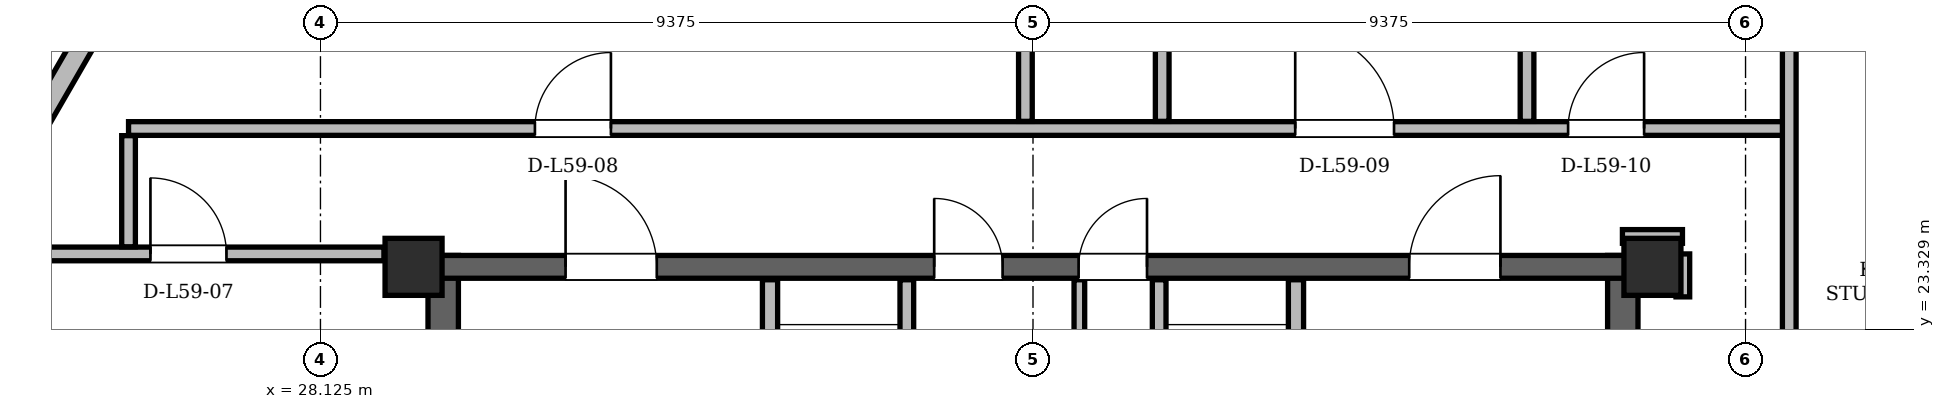
"""IFC4 building model, lengths in metres.
Left out: names, types, materials, properties, quantities, classifications, styles, units other than length and angle.
Written with IfcOpenShell. Run it as: python <this file> out.ifc"""

import sys

from ifc_helpers import new_model, si_unit, direction, frame, frame_2d, origin, origin_2d, place, context, subcontext, project, spatial, rectangle, hollow_rectangle, extrude, element, fill, save


model = new_model("IFC4")
c1 = context("Model", 3, precision=1e-05, world=origin(), true_north=direction((0.0, 1.0)))
c2 = subcontext(c1, "Body", "Model", "MODEL_VIEW")
j1 = project(units=[si_unit("LENGTHUNIT", "METRE"), si_unit("PLANEANGLEUNIT", "RADIAN")], contexts=[c1])
p1 = place(None, origin())
s1 = spatial("IfcSite", under=j1, at=p1, CompositionType="ELEMENT")
p2 = place(p1, origin())
s2 = spatial("IfcBuilding", under=s1, at=p2, CompositionType="ELEMENT")
p3 = place(p2, frame((0.0, 0.0, 223.5)))
s3 = spatial("IfcBuildingStorey", under=s2, at=p3, CompositionType="ELEMENT", Elevation=223.5)
for number, where, z_axis, x_axis in (
    (1, (45.65, 24.15, 0.0), (0.0, 0.0, 1.0), (1.0, 0.0, 0.0)),
    (2, (29.35, 24.15, 0.0), (0.0, 0.0, 1.0), (1.0, 0.0, 0.0)),
):
    element("IfcColumn", number, at=place(p3, frame(where, z_axis=z_axis, x_axis=x_axis)), inside=s3, PredefinedType="COLUMN", context=c2, shape_type="SweptSolid", body=[
        extrude(hollow_rectangle(XDim=0.75, YDim=0.75, WallThickness=0.06, at=origin_2d()), origin(), (0.0, 0.0, 1.0), 3.6),
    ])
for number, where, z_axis, x_axis in (
    (3, (29.74, 11.0, 0.0), (0.0, 0.0, 1.0), (0.0, 1.0, 0.0)),
    (4, (45.26, 11.0, 0.0), (0.0, 0.0, 1.0), (0.0, 1.0, 0.0)),
):
    element("IfcWall", number, at=place(p3, frame(where, z_axis=z_axis, x_axis=x_axis)), inside=s3, PredefinedType="SHEAR", context=c2, shape_type="SweptSolid", body=[
        extrude(rectangle(XDim=13.3, YDim=0.4, at=frame_2d((6.65, 0.0))), origin(), (0.0, 0.0, 1.0), 3.38),
    ])
p4 = place(p3, frame((29.65, 24.15, 0.0), z_axis=(0.0, 0.0, 1.0), x_axis=(1.0, 0.0, 0.0)))
e5 = element("IfcWall", 5, at=p4, inside=s3, PredefinedType="SHEAR", context=c2, shape_type="SweptSolid", body=[
    extrude(rectangle(XDim=15.7, YDim=0.3, at=frame_2d((7.85, 0.0))), origin(), (0.0, 0.0, 1.0), 3.38),
])
p5 = place(p4, frame((1.7, 0.0, 0.0)))
e6 = element("IfcOpeningElement", 6, at=p5, cuts=e5, PredefinedType="OPENING", context=c2, shape_type="SweptSolid", body=[
    extrude(rectangle(XDim=1.2, YDim=2.2, at=frame_2d((0.6, 1.1))), frame((0.0, 0.15, 0.0), z_axis=(0.0, -1.0, 0.0), x_axis=(1.0, 0.0, 0.0)), (0.0, 0.0, 1.0), 0.3),
])
p6 = place(p4, frame((12.8, 0.0, 0.0)))
e7 = element("IfcOpeningElement", 7, at=p6, cuts=e5, PredefinedType="OPENING", context=c2, shape_type="SweptSolid", body=[
    extrude(rectangle(XDim=1.2, YDim=2.2, at=frame_2d((0.6, 1.1))), frame((0.0, 0.15, 0.0), z_axis=(0.0, -1.0, 0.0), x_axis=(1.0, 0.0, 0.0)), (0.0, 0.0, 1.0), 0.3),
])
p7 = place(p4, frame((6.55, 0.0, 0.0)))
e8 = element("IfcOpeningElement", 8, at=p7, cuts=e5, PredefinedType="OPENING", context=c2, shape_type="SweptSolid", body=[
    extrude(rectangle(XDim=0.9, YDim=2.05, at=frame_2d((0.45, 1.025))), frame((0.0, 0.15, 0.0), z_axis=(0.0, -1.0, 0.0), x_axis=(1.0, 0.0, 0.0)), (0.0, 0.0, 1.0), 0.3),
])
p8 = place(p4, frame((8.45, 0.0, 0.0)))
e9 = element("IfcOpeningElement", 9, at=p8, cuts=e5, PredefinedType="OPENING", context=c2, shape_type="SweptSolid", body=[
    extrude(rectangle(XDim=0.9, YDim=2.05, at=frame_2d((0.45, 1.025))), frame((0.0, 0.15, 0.0), z_axis=(0.0, -1.0, 0.0), x_axis=(1.0, 0.0, 0.0)), (0.0, 0.0, 1.0), 0.3),
])
p9 = place(p3, frame((59.07, 11.372, 0.0), z_axis=(0.0, 0.0, 1.0), x_axis=(-0.500000292553, 0.866025234879, 0.0)))
e10 = element("IfcWall", 10, at=p9, inside=s3, PredefinedType="SOLIDWALL", context=c2, shape_type="SweptSolid", body=[
    extrude(rectangle(XDim=36.688, YDim=0.29, at=frame_2d((18.344, 0.0))), origin(), (0.0, 0.0, 1.0), 2.677),
])
p10 = place(p9, frame((3.429, 0.0, 0.0)))
e11 = element("IfcOpeningElement", 11, at=p10, cuts=e10, PredefinedType="OPENING", context=c2, shape_type="SweptSolid", body=[
    extrude(rectangle(XDim=1.5, YDim=2.2, at=frame_2d((0.75, 1.1))), frame((0.0, 0.145, 0.0), z_axis=(0.0, -1.0, 0.0), x_axis=(1.0, 0.0, 0.0)), (0.0, 0.0, 1.0), 0.29),
])
p11 = place(p9, frame((27.154, 0.0, 0.0)))
e12 = element("IfcOpeningElement", 12, at=p11, cuts=e10, PredefinedType="OPENING", context=c2, shape_type="SweptSolid", body=[
    extrude(rectangle(XDim=1.5, YDim=2.2, at=frame_2d((0.75, 1.1))), frame((0.0, 0.145, 0.0), z_axis=(0.0, -1.0, 0.0), x_axis=(1.0, 0.0, 0.0)), (0.0, 0.0, 1.0), 0.29),
])
p12 = place(p9, frame((7.878, 0.0, 0.85)))
e13 = element("IfcOpeningElement", 13, at=p12, cuts=e10, PredefinedType="OPENING", context=c2, shape_type="SweptSolid", body=[
    extrude(rectangle(XDim=1.2, YDim=1.48, at=frame_2d((0.6, 0.74))), frame((0.0, 0.145, 0.0), z_axis=(0.0, -1.0, 0.0), x_axis=(1.0, 0.0, 0.0)), (0.0, 0.0, 1.0), 0.29),
])
p13 = place(p9, frame((1.266, 0.0, 0.85)))
e14 = element("IfcOpeningElement", 14, at=p13, cuts=e10, PredefinedType="OPENING", context=c2, shape_type="SweptSolid", body=[
    extrude(rectangle(XDim=1.2, YDim=1.48, at=frame_2d((0.6, 0.74))), frame((0.0, 0.145, 0.0), z_axis=(0.0, -1.0, 0.0), x_axis=(1.0, 0.0, 0.0)), (0.0, 0.0, 1.0), 0.29),
])
p14 = place(p9, frame((12.232, 0.0, 0.85)))
e15 = element("IfcOpeningElement", 15, at=p14, cuts=e10, PredefinedType="OPENING", context=c2, shape_type="SweptSolid", body=[
    extrude(rectangle(XDim=2.0, YDim=1.717, at=frame_2d((1.0, 0.858))), frame((0.0, 0.145, 0.0), z_axis=(0.0, -1.0, 0.0), x_axis=(1.0, 0.0, 0.0)), (0.0, 0.0, 1.0), 0.29),
])
p15 = place(p9, frame((17.268, 0.0, 0.85)))
e16 = element("IfcOpeningElement", 16, at=p15, cuts=e10, PredefinedType="OPENING", context=c2, shape_type="SweptSolid", body=[
    extrude(rectangle(XDim=1.4, YDim=1.6, at=frame_2d((0.7, 0.8))), frame((0.0, 0.145, 0.0), z_axis=(0.0, -1.0, 0.0), x_axis=(1.0, 0.0, 0.0)), (0.0, 0.0, 1.0), 0.29),
])
p16 = place(p9, frame((20.594, 0.0, 0.85)))
e17 = element("IfcOpeningElement", 17, at=p16, cuts=e10, PredefinedType="OPENING", context=c2, shape_type="SweptSolid", body=[
    extrude(rectangle(XDim=1.2, YDim=1.48, at=frame_2d((0.6, 0.74))), frame((0.0, 0.145, 0.0), z_axis=(0.0, -1.0, 0.0), x_axis=(1.0, 0.0, 0.0)), (0.0, 0.0, 1.0), 0.29),
])
p17 = place(p9, frame((34.312, 0.0, 0.85)))
e18 = element("IfcOpeningElement", 18, at=p17, cuts=e10, PredefinedType="OPENING", context=c2, shape_type="SweptSolid", body=[
    extrude(rectangle(XDim=1.2, YDim=1.48, at=frame_2d((0.6, 0.74))), frame((0.0, 0.145, 0.0), z_axis=(0.0, -1.0, 0.0), x_axis=(1.0, 0.0, 0.0)), (0.0, 0.0, 1.0), 0.29),
])
p18 = place(p3, frame((34.274, 43.144, 0.0), z_axis=(0.0, 0.0, 1.0), x_axis=(-0.500000292553, -0.866025234879, 0.0)))
e19 = element("IfcWall", 19, at=p18, inside=s3, PredefinedType="SOLIDWALL", context=c2, shape_type="SweptSolid", body=[
    extrude(rectangle(XDim=36.688, YDim=0.29, at=frame_2d((18.344, 0.0))), origin(), (0.0, 0.0, 1.0), 2.677),
])
p19 = place(p18, frame((3.429, 0.0, 0.0)))
e20 = element("IfcOpeningElement", 20, at=p19, cuts=e19, PredefinedType="OPENING", context=c2, shape_type="SweptSolid", body=[
    extrude(rectangle(XDim=1.5, YDim=2.2, at=frame_2d((0.75, 1.1))), frame((0.0, 0.145, 0.0), z_axis=(0.0, -1.0, 0.0), x_axis=(1.0, 0.0, 0.0)), (0.0, 0.0, 1.0), 0.29),
])
p20 = place(p18, frame((27.154, 0.0, 0.0)))
e21 = element("IfcOpeningElement", 21, at=p20, cuts=e19, PredefinedType="OPENING", context=c2, shape_type="SweptSolid", body=[
    extrude(rectangle(XDim=1.5, YDim=2.2, at=frame_2d((0.75, 1.1))), frame((0.0, 0.145, 0.0), z_axis=(0.0, -1.0, 0.0), x_axis=(1.0, 0.0, 0.0)), (0.0, 0.0, 1.0), 0.29),
])
p21 = place(p18, frame((22.893, 0.0, 0.85)))
e22 = element("IfcOpeningElement", 22, at=p21, cuts=e19, PredefinedType="OPENING", context=c2, shape_type="SweptSolid", body=[
    extrude(rectangle(XDim=1.2, YDim=1.48, at=frame_2d((0.6, 0.74))), frame((0.0, 0.145, 0.0), z_axis=(0.0, -1.0, 0.0), x_axis=(1.0, 0.0, 0.0)), (0.0, 0.0, 1.0), 0.29),
])
p22 = place(p18, frame((33.124, 0.0, 0.85)))
e23 = element("IfcOpeningElement", 23, at=p22, cuts=e19, PredefinedType="OPENING", context=c2, shape_type="SweptSolid", body=[
    extrude(rectangle(XDim=1.2, YDim=1.48, at=frame_2d((0.6, 0.74))), frame((0.0, 0.145, 0.0), z_axis=(0.0, -1.0, 0.0), x_axis=(1.0, 0.0, 0.0)), (0.0, 0.0, 1.0), 0.29),
])
p23 = place(p18, frame((8.469, 0.0, 0.85)))
e24 = element("IfcOpeningElement", 24, at=p23, cuts=e19, PredefinedType="OPENING", context=c2, shape_type="SweptSolid", body=[
    extrude(rectangle(XDim=1.2, YDim=1.48, at=frame_2d((0.6, 0.74))), frame((0.0, 0.145, 0.0), z_axis=(0.0, -1.0, 0.0), x_axis=(1.0, 0.0, 0.0)), (0.0, 0.0, 1.0), 0.29),
])
p24 = place(p18, frame((15.521, 0.0, 0.85)))
e25 = element("IfcOpeningElement", 25, at=p24, cuts=e19, PredefinedType="OPENING", context=c2, shape_type="SweptSolid", body=[
    extrude(rectangle(XDim=2.8, YDim=1.717, at=frame_2d((1.4, 0.858))), frame((0.0, 0.145, 0.0), z_axis=(0.0, -1.0, 0.0), x_axis=(1.0, 0.0, 0.0)), (0.0, 0.0, 1.0), 0.29),
])
p25 = place(p18, frame((1.499, 0.0, 0.85)))
e26 = element("IfcOpeningElement", 26, at=p25, cuts=e19, PredefinedType="OPENING", context=c2, shape_type="SweptSolid", body=[
    extrude(rectangle(XDim=1.2, YDim=1.48, at=frame_2d((0.6, 0.74))), frame((0.0, 0.145, 0.0), z_axis=(0.0, -1.0, 0.0), x_axis=(1.0, 0.0, 0.0)), (0.0, 0.0, 1.0), 0.29),
])
p26 = place(p3, frame((34.04, 19.48, 0.0), z_axis=(0.0, 0.0, 1.0), x_axis=(0.0, 1.0, 0.0)))
e27 = element("IfcWall", 27, at=p26, inside=s3, PredefinedType="PARTITIONING", context=c2, shape_type="SweptSolid", body=[
    extrude(rectangle(XDim=4.5, YDim=0.2, at=frame_2d((2.25, 0.0))), origin(), (0.0, 0.0, 1.0), 3.38),
])
p27 = place(p26, frame((2.12, 0.0, 0.0)))
e28 = element("IfcOpeningElement", 28, at=p27, cuts=e27, PredefinedType="OPENING", context=c2, shape_type="SweptSolid", body=[
    extrude(rectangle(XDim=1.1, YDim=2.2, at=frame_2d((0.55, 1.1))), frame((0.0, 0.1, 0.0), z_axis=(0.0, -1.0, 0.0), x_axis=(1.0, 0.0, 0.0)), (0.0, 0.0, 1.0), 0.2),
])
p28 = place(p3, frame((35.84, 20.96, 0.0), z_axis=(0.0, 0.0, 1.0), x_axis=(0.0, 1.0, 0.0)))
e29 = element("IfcWall", 29, at=p28, inside=s3, PredefinedType="PARTITIONING", context=c2, shape_type="SweptSolid", body=[
    extrude(rectangle(XDim=3.02, YDim=0.18, at=frame_2d((1.51, 0.0))), origin(), (0.0, 0.0, 1.0), 3.38),
])
p29 = place(p3, frame((40.96, 19.48, 0.0), z_axis=(0.0, 0.0, 1.0), x_axis=(0.0, 1.0, 0.0)))
e30 = element("IfcWall", 30, at=p29, inside=s3, PredefinedType="PARTITIONING", context=c2, shape_type="SweptSolid", body=[
    extrude(rectangle(XDim=4.5, YDim=0.2, at=frame_2d((2.25, 0.0))), origin(), (0.0, 0.0, 1.0), 3.38),
])
p30 = place(p29, frame((2.12, 0.0, 0.0)))
e31 = element("IfcOpeningElement", 31, at=p30, cuts=e30, PredefinedType="OPENING", context=c2, shape_type="SweptSolid", body=[
    extrude(rectangle(XDim=1.1, YDim=2.2, at=frame_2d((0.55, 1.1))), frame((0.0, 0.1, 0.0), z_axis=(0.0, -1.0, 0.0), x_axis=(1.0, 0.0, 0.0)), (0.0, 0.0, 1.0), 0.2),
])
p31 = place(p3, frame((39.16, 20.96, 0.0), z_axis=(0.0, 0.0, 1.0), x_axis=(0.0, 1.0, 0.0)))
e32 = element("IfcWall", 32, at=p31, inside=s3, PredefinedType="PARTITIONING", context=c2, shape_type="SweptSolid", body=[
    extrude(rectangle(XDim=3.02, YDim=0.18, at=frame_2d((1.51, 0.0))), origin(), (0.0, 0.0, 1.0), 3.38),
])
p32 = place(p3, frame((38.11, 21.06, 0.0), z_axis=(0.0, 0.0, 1.0), x_axis=(0.0, 1.0, 0.0)))
e33 = element("IfcWall", 33, at=p32, inside=s3, PredefinedType="PARTITIONING", context=c2, shape_type="SweptSolid", body=[
    extrude(rectangle(XDim=2.92, YDim=0.14, at=frame_2d((1.46, 0.0))), origin(), (0.0, 0.0, 1.0), 3.38),
])
p33 = place(p3, frame((23.578, 24.32, 0.0), z_axis=(0.0, 0.0, 1.0), x_axis=(1.0, 0.0, 0.0)))
e34 = element("IfcWall", 34, at=p33, inside=s3, PredefinedType="PARTITIONING", context=c2, shape_type="SweptSolid", body=[
    extrude(rectangle(XDim=5.382, YDim=0.18, at=frame_2d((2.691, 0.0))), origin(), (0.0, 0.0, 1.0), 3.38),
])
p34 = place(p33, frame((2.31, 0.0, 0.0)))
e35 = element("IfcOpeningElement", 35, at=p34, cuts=e34, PredefinedType="OPENING", context=c2, shape_type="SweptSolid", body=[
    extrude(rectangle(XDim=1.0, YDim=2.18, at=frame_2d((0.5, 1.09))), frame((0.0, 0.09, 0.0), z_axis=(0.0, -1.0, 0.0), x_axis=(1.0, 0.0, 0.0)), (0.0, 0.0, 1.0), 0.18),
])
p35 = place(p3, frame((45.255, 24.55, 0.0), z_axis=(0.0, 0.0, 1.0), x_axis=(1.0, 0.0, 0.0)))
e36 = element("IfcWall", 36, at=p35, inside=s3, PredefinedType="PARTITIONING", context=c2, shape_type="SweptSolid", body=[
    extrude(rectangle(XDim=0.79, YDim=0.18, at=frame_2d((0.395, 0.0))), origin(), (0.0, 0.0, 1.0), 2.913),
])
p36 = place(p3, frame((25.6, 25.97, 0.0), z_axis=(0.0, 0.0, 1.0), x_axis=(1.0, 0.0, 0.0)))
e37 = element("IfcWall", 37, at=p36, inside=s3, PredefinedType="PARTITIONING", context=c2, shape_type="SweptSolid", body=[
    extrude(rectangle(XDim=21.85, YDim=0.18, at=frame_2d((10.925, 0.0))), origin(), (0.0, 0.0, 1.0), 2.913),
])
p37 = place(p36, frame((5.347, 0.0, 0.0)))
e38 = element("IfcOpeningElement", 38, at=p37, cuts=e37, PredefinedType="OPENING", context=c2, shape_type="SweptSolid", body=[
    extrude(rectangle(XDim=1.0, YDim=2.18, at=frame_2d((0.5, 1.09))), frame((0.0, 0.09, 0.0), z_axis=(0.0, -1.0, 0.0), x_axis=(1.0, 0.0, 0.0)), (0.0, 0.0, 1.0), 0.18),
])
p38 = place(p36, frame((15.35, 0.0, 0.0)))
e39 = element("IfcOpeningElement", 39, at=p38, cuts=e37, PredefinedType="OPENING", context=c2, shape_type="SweptSolid", body=[
    extrude(rectangle(XDim=1.3, YDim=2.2, at=frame_2d((0.65, 1.1))), frame((0.0, 0.09, 0.0), z_axis=(0.0, -1.0, 0.0), x_axis=(1.0, 0.0, 0.0)), (0.0, 0.0, 1.0), 0.18),
])
p39 = place(p36, frame((18.94, 0.0, 0.0)))
e40 = element("IfcOpeningElement", 40, at=p39, cuts=e37, PredefinedType="OPENING", context=c2, shape_type="SweptSolid", body=[
    extrude(rectangle(XDim=1.0, YDim=2.18, at=frame_2d((0.5, 1.09))), frame((0.0, 0.09, 0.0), z_axis=(0.0, -1.0, 0.0), x_axis=(1.0, 0.0, 0.0)), (0.0, 0.0, 1.0), 0.18),
])
p40 = place(p3, frame((25.6, 24.414, 0.0), z_axis=(0.0, 0.0, 1.0), x_axis=(0.0, 1.0, 0.0)))
e41 = element("IfcWall", 41, at=p40, inside=s3, PredefinedType="PARTITIONING", context=c2, shape_type="SweptSolid", body=[
    extrude(rectangle(XDim=1.462, YDim=0.18, at=frame_2d((0.731, 0.0))), origin(), (0.0, 0.0, 1.0), 3.38),
])
p41 = place(p3, frame((37.4, 26.064, 0.0), z_axis=(0.0, 0.0, 1.0), x_axis=(0.0, 1.0, 0.0)))
e42 = element("IfcWall", 42, at=p41, inside=s3, PredefinedType="PARTITIONING", context=c2, shape_type="SweptSolid", body=[
    extrude(rectangle(XDim=16.931, YDim=0.18, at=frame_2d((8.466, 0.0))), origin(), (0.0, 0.0, 1.0), 3.38),
])
p42 = place(p3, frame((39.2, 26.064, 0.0), z_axis=(0.0, 0.0, 1.0), x_axis=(0.0, 1.0, 0.0)))
e43 = element("IfcWall", 43, at=p42, inside=s3, PredefinedType="PARTITIONING", context=c2, shape_type="SweptSolid", body=[
    extrude(rectangle(XDim=4.312, YDim=0.18, at=frame_2d((2.156, 0.0))), origin(), (0.0, 0.0, 1.0), 3.38),
])
p43 = place(p3, frame((44.0, 26.064, 0.0), z_axis=(0.0, 0.0, 1.0), x_axis=(0.0, 1.0, 0.0)))
e44 = element("IfcWall", 44, at=p43, inside=s3, PredefinedType="PARTITIONING", context=c2, shape_type="SweptSolid", body=[
    extrude(rectangle(XDim=4.312, YDim=0.18, at=frame_2d((2.156, 0.0))), origin(), (0.0, 0.0, 1.0), 2.913),
])
p44 = place(p3, frame((46.05, 23.755, 0.0), z_axis=(0.0, 0.0, 1.0), x_axis=(0.0, 1.0, 0.0)))
e45 = element("IfcWall", 45, at=p44, inside=s3, PredefinedType="PARTITIONING", context=c2, shape_type="SweptSolid", body=[
    extrude(rectangle(XDim=0.565, YDim=0.18, at=frame_2d((0.283, 0.0))), origin(), (0.0, 0.0, 1.0), 3.38),
])
p45 = place(p3, frame((47.45, 5.933, 0.0), z_axis=(0.0, 0.0, 1.0), x_axis=(0.0, 1.0, 0.0)))
e46 = element("IfcWall", 46, at=p45, inside=s3, PredefinedType="PARTITIONING", context=c2, shape_type="SweptSolid", body=[
    extrude(rectangle(XDim=25.267, YDim=0.18, at=frame_2d((12.634, 0.0))), origin(), (0.0, 0.0, 1.0), 2.913),
])
p46 = place(p45, frame((8.989, 0.0, 0.0)))
e47 = element("IfcOpeningElement", 47, at=p46, cuts=e46, PredefinedType="OPENING", context=c2, shape_type="SweptSolid", body=[
    extrude(rectangle(XDim=1.0, YDim=2.18, at=frame_2d((0.5, 1.09))), frame((0.0, 0.09, 0.0), z_axis=(0.0, -1.0, 0.0), x_axis=(1.0, 0.0, 0.0)), (0.0, 0.0, 1.0), 0.18),
])
p47 = place(p45, frame((15.779, 0.0, 0.0)))
e48 = element("IfcOpeningElement", 48, at=p47, cuts=e46, PredefinedType="OPENING", context=c2, shape_type="SweptSolid", body=[
    extrude(rectangle(XDim=1.0, YDim=2.18, at=frame_2d((0.5, 1.09))), frame((0.0, 0.09, 0.0), z_axis=(0.0, -1.0, 0.0), x_axis=(1.0, 0.0, 0.0)), (0.0, 0.0, 1.0), 0.18),
])
p48 = place(p5, origin())
e49 = element("IfcDoor", 49, at=p48, inside=s3, OperationType="SINGLE_SWING_LEFT", PredefinedType="DOOR", context=c2, shape_type="SweptSolid", body=[
    extrude(rectangle(XDim=1.2, YDim=2.2, at=frame_2d((0.6, 1.1))), frame((0.0, 0.025, 0.0), z_axis=(0.0, -1.0, 0.0), x_axis=(1.0, 0.0, 0.0)), (0.0, 0.0, 1.0), 0.05),
])
fill(e6, e49)
p49 = place(p6, origin())
e50 = element("IfcDoor", 50, at=p49, inside=s3, OperationType="SINGLE_SWING_RIGHT", PredefinedType="DOOR", context=c2, shape_type="SweptSolid", body=[
    extrude(rectangle(XDim=1.2, YDim=2.2, at=frame_2d((0.6, 1.1))), frame((0.0, 0.025, 0.0), z_axis=(0.0, -1.0, 0.0), x_axis=(1.0, 0.0, 0.0)), (0.0, 0.0, 1.0), 0.05),
])
fill(e7, e50)
p50 = place(p7, origin())
e51 = element("IfcDoor", 51, at=p50, inside=s3, OperationType="SINGLE_SWING_LEFT", PredefinedType="DOOR", context=c2, shape_type="SweptSolid", body=[
    extrude(rectangle(XDim=0.9, YDim=2.05, at=frame_2d((0.45, 1.025))), frame((0.0, 0.025, 0.0), z_axis=(0.0, -1.0, 0.0), x_axis=(1.0, 0.0, 0.0)), (0.0, 0.0, 1.0), 0.05),
])
fill(e8, e51)
p51 = place(p8, origin())
e52 = element("IfcDoor", 52, at=p51, inside=s3, OperationType="SINGLE_SWING_RIGHT", PredefinedType="DOOR", context=c2, shape_type="SweptSolid", body=[
    extrude(rectangle(XDim=0.9, YDim=2.05, at=frame_2d((0.45, 1.025))), frame((0.0, 0.025, 0.0), z_axis=(0.0, -1.0, 0.0), x_axis=(1.0, 0.0, 0.0)), (0.0, 0.0, 1.0), 0.05),
])
fill(e9, e52)
p52 = place(p34, origin())
e53 = element("IfcDoor", 53, at=p52, inside=s3, OperationType="SINGLE_SWING_LEFT", PredefinedType="DOOR", context=c2, shape_type="SweptSolid", body=[
    extrude(rectangle(XDim=1.0, YDim=2.18, at=frame_2d((0.5, 1.09))), frame((0.0, 0.025, 0.0), z_axis=(0.0, -1.0, 0.0), x_axis=(1.0, 0.0, 0.0)), (0.0, 0.0, 1.0), 0.05),
])
fill(e35, e53)
p53 = place(p37, origin())
e54 = element("IfcDoor", 54, at=p53, inside=s3, OperationType="SINGLE_SWING_RIGHT", PredefinedType="DOOR", context=c2, shape_type="SweptSolid", body=[
    extrude(rectangle(XDim=1.0, YDim=2.18, at=frame_2d((0.5, 1.09))), frame((0.0, 0.025, 0.0), z_axis=(0.0, -1.0, 0.0), x_axis=(1.0, 0.0, 0.0)), (0.0, 0.0, 1.0), 0.05),
])
fill(e38, e54)
p54 = place(p38, origin())
e55 = element("IfcDoor", 55, at=p54, inside=s3, OperationType="SINGLE_SWING_LEFT", PredefinedType="DOOR", context=c2, shape_type="SweptSolid", body=[
    extrude(rectangle(XDim=1.3, YDim=2.2, at=frame_2d((0.65, 1.1))), frame((0.0, 0.025, 0.0), z_axis=(0.0, -1.0, 0.0), x_axis=(1.0, 0.0, 0.0)), (0.0, 0.0, 1.0), 0.05),
])
fill(e39, e55)
p55 = place(p39, origin())
e56 = element("IfcDoor", 56, at=p55, inside=s3, OperationType="SINGLE_SWING_RIGHT", PredefinedType="DOOR", context=c2, shape_type="SweptSolid", body=[
    extrude(rectangle(XDim=1.0, YDim=2.18, at=frame_2d((0.5, 1.09))), frame((0.0, 0.025, 0.0), z_axis=(0.0, -1.0, 0.0), x_axis=(1.0, 0.0, 0.0)), (0.0, 0.0, 1.0), 0.05),
])
fill(e40, e56)
save(model, sys.argv[1])
